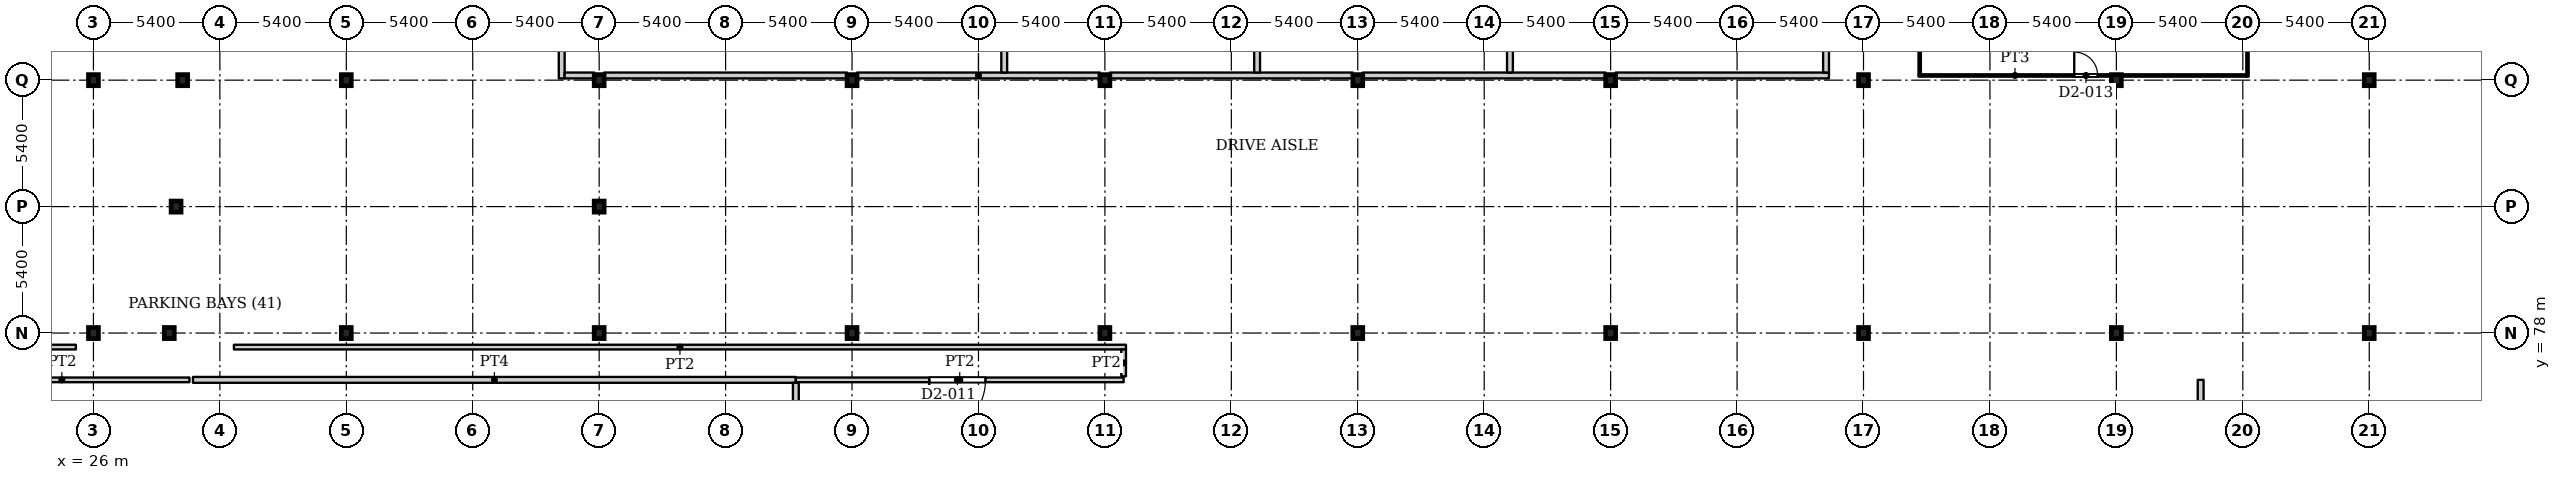
"""IFC4 building model, lengths in metres.
Left out: names, types, materials, properties, quantities, classifications, styles, units other than length and angle.
Written with IfcOpenShell. Run it as: python <this file> out.ifc"""

import sys

from ifc_helpers import new_model, si_unit, direction, frame, frame_2d, origin, origin_2d, place, context, subcontext, project, spatial, rectangle, i_section, extrude, source, transform, mapped, element, fill, save


model = new_model("IFC4")
c1 = context("Model", 3, precision=1e-05, world=origin(), true_north=direction((0.0, 1.0)))
c2 = subcontext(c1, "Body", "Model", "MODEL_VIEW")
j1 = project(units=[si_unit("LENGTHUNIT", "METRE"), si_unit("PLANEANGLEUNIT", "RADIAN")], contexts=[c1])
p1 = place(None, origin())
s1 = spatial("IfcSite", under=j1, at=p1, CompositionType="ELEMENT")
p2 = place(p1, origin())
s2 = spatial("IfcBuilding", under=s1, at=p2, CompositionType="ELEMENT")
p3 = place(p2, frame((0.0, 0.0, -10.0)))
s3 = spatial("IfcBuildingStorey", under=s2, at=p3, CompositionType="ELEMENT", Elevation=-10.0)
for number, where, z_axis, x_axis in (
    (1, (26.0, 78.0, 0.0), (0.0, 0.0, 1.0), (1.0, 0.0, 0.0)),
    (2, (36.8, 78.0, 0.0), (0.0, 0.0, 1.0), (1.0, 0.0, 0.0)),
    (3, (47.6, 78.0, 0.0), (0.0, 0.0, 1.0), (1.0, 0.0, 0.0)),
    (4, (58.4, 78.0, 0.0), (0.0, 0.0, 1.0), (1.0, 0.0, 0.0)),
    (5, (69.2, 78.0, 0.0), (0.0, 0.0, 1.0), (1.0, 0.0, 0.0)),
    (6, (80.0, 78.0, 0.0), (0.0, 0.0, 1.0), (1.0, 0.0, 0.0)),
    (7, (90.8, 78.0, 0.0), (0.0, 0.0, 1.0), (1.0, 0.0, 0.0)),
    (8, (101.6, 78.0, 0.0), (0.0, 0.0, 1.0), (1.0, 0.0, 0.0)),
    (9, (112.4, 78.0, 0.0), (0.0, 0.0, 1.0), (1.0, 0.0, 0.0)),
    (10, (123.2, 78.0, 0.0), (0.0, 0.0, 1.0), (1.0, 0.0, 0.0)),
    (11, (26.0, 88.8, 0.0), (0.0, 0.0, 1.0), (1.0, 0.0, 0.0)),
    (12, (36.8, 88.8, 0.0), (0.0, 0.0, 1.0), (1.0, 0.0, 0.0)),
    (13, (47.6, 88.8, 0.0), (0.0, 0.0, 1.0), (1.0, 0.0, 0.0)),
    (14, (58.4, 88.8, 0.0), (0.0, 0.0, 1.0), (1.0, 0.0, 0.0)),
    (15, (69.2, 88.8, 0.0), (0.0, 0.0, 1.0), (1.0, 0.0, 0.0)),
    (16, (80.0, 88.8, 0.0), (0.0, 0.0, 1.0), (1.0, 0.0, 0.0)),
    (17, (90.8, 88.8, 0.0), (0.0, 0.0, 1.0), (1.0, 0.0, 0.0)),
    (18, (101.6, 88.8, 0.0), (0.0, 0.0, 1.0), (1.0, 0.0, 0.0)),
    (19, (112.4, 88.8, 0.0), (0.0, 0.0, 1.0), (1.0, 0.0, 0.0)),
    (20, (123.2, 88.8, 0.0), (0.0, 0.0, 1.0), (1.0, 0.0, 0.0)),
    (21, (29.24, 78.0, 0.0), (0.0, 0.0, 1.0), (1.0, 0.0, 0.0)),
    (22, (29.53, 83.4, 0.0), (0.0, 0.0, 1.0), (1.0, 0.0, 0.0)),
    (23, (47.6, 83.4, 0.0), (0.0, 0.0, 1.0), (1.0, 0.0, 0.0)),
    (24, (29.81, 88.8, 0.0), (0.0, 0.0, 1.0), (1.0, 0.0, 0.0)),
):
    element("IfcColumn", number, at=place(p3, frame(where, z_axis=z_axis, x_axis=x_axis)), inside=s3, PredefinedType="COLUMN", context=c2, shape_type="SweptSolid", body=[
        extrude(i_section(OverallWidth=0.424, OverallDepth=0.474, WebThickness=0.048, FlangeThickness=0.077, FilletRadius=0.014, at=origin_2d()), origin(), (0.0, 0.0, 1.0), 5.0),
    ])
p4 = place(p3, frame((16.7, 77.4, 0.0), z_axis=(0.0, 0.0, 1.0), x_axis=(1.0, 0.0, 0.0)))
e25 = element("IfcWall", 25, at=p4, inside=s3, PredefinedType="PARTITIONING", context=c2, shape_type="SweptSolid", body=[
    extrude(rectangle(XDim=8.55, YDim=0.2, at=frame_2d((4.275, 0.0))), origin(), (0.0, 0.0, 1.0), 4.58),
])
p5 = place(p3, frame((19.2, 76.0, 0.0), z_axis=(0.0, 0.0, 1.0), x_axis=(1.0, 0.0, 0.0)))
e26 = element("IfcWall", 26, at=p5, inside=s3, PredefinedType="PARTITIONING", context=c2, shape_type="SweptSolid", body=[
    extrude(rectangle(XDim=10.9, YDim=0.2, at=frame_2d((5.45, 0.0))), origin(), (0.0, 0.0, 1.0), 4.58),
])
p6 = place(p3, frame((30.25, 76.0, 0.0), z_axis=(0.0, 0.0, 1.0), x_axis=(1.0, 0.0, 0.0)))
e27 = element("IfcWall", 27, at=p6, inside=s3, PredefinedType="PARTITIONING", context=c2, shape_type="SweptSolid", body=[
    extrude(rectangle(XDim=25.75, YDim=0.25, at=frame_2d((12.875, 0.0))), origin(), (0.0, 0.0, 1.0), 4.58),
])
p7 = place(p3, frame((32.0, 77.4, 0.0), z_axis=(0.0, 0.0, 1.0), x_axis=(1.0, 0.0, 0.0)))
e28 = element("IfcWall", 28, at=p7, inside=s3, PredefinedType="PARTITIONING", context=c2, shape_type="SweptSolid", body=[
    extrude(rectangle(XDim=38.1, YDim=0.2, at=frame_2d((19.05, 0.0))), origin(), (0.0, 0.0, 1.0), 4.58),
])
p8 = place(p3, frame((46.0, 88.875, 0.0), z_axis=(0.0, 0.0, 1.0), x_axis=(0.0, 1.0, 0.0)))
e29 = element("IfcWall", 29, at=p8, inside=s3, PredefinedType="PARTITIONING", context=c2, shape_type="SweptSolid", body=[
    extrude(rectangle(XDim=7.8, YDim=0.25, at=frame_2d((3.9, 0.0))), origin(), (0.0, 0.0, 1.0), 4.58),
])
p9 = place(p3, frame((46.125, 89.0, 0.0), z_axis=(0.0, 0.0, 1.0), x_axis=(1.0, 0.0, 0.0)))
e30 = element("IfcWall", 30, at=p9, inside=s3, PredefinedType="PARTITIONING", context=c2, shape_type="SweptSolid", body=[
    extrude(rectangle(XDim=1.264, YDim=0.25, at=frame_2d((0.632, 0.0))), origin(), (0.0, 0.0, 1.0), 4.58),
])
p10 = place(p3, frame((47.811, 89.0, 0.0), z_axis=(0.0, 0.0, 1.0), x_axis=(1.0, 0.0, 0.0)))
e31 = element("IfcWall", 31, at=p10, inside=s3, PredefinedType="PARTITIONING", context=c2, shape_type="SweptSolid", body=[
    extrude(rectangle(XDim=10.378, YDim=0.25, at=frame_2d((5.189, 0.0))), origin(), (0.0, 0.0, 1.0), 4.58),
])
p11 = place(p3, frame((56.0, 69.4, 0.0), z_axis=(0.0, 0.0, 1.0), x_axis=(0.0, 1.0, 0.0)))
e32 = element("IfcWall", 32, at=p11, inside=s3, PredefinedType="PARTITIONING", context=c2, shape_type="SweptSolid", body=[
    extrude(rectangle(XDim=6.475, YDim=0.25, at=frame_2d((3.238, 0.0))), origin(), (0.0, 0.0, 1.0), 4.58),
])
p12 = place(p11, frame((2.75, 0.0, 0.0)))
e33 = element("IfcOpeningElement", 33, at=p12, cuts=e32, PredefinedType="OPENING", context=c2, shape_type="SweptSolid", body=[
    extrude(rectangle(XDim=1.2, YDim=2.1, at=frame_2d((0.6, 1.05))), frame((0.0, 0.135, 0.0), z_axis=(0.0, -1.0, 0.0), x_axis=(1.0, 0.0, 0.0)), (0.0, 0.0, 1.0), 0.27),
])
p13 = place(p3, frame((56.0, 76.0, 0.0), z_axis=(0.0, 0.0, 1.0), x_axis=(1.0, 0.0, 0.0)))
e34 = element("IfcWall", 34, at=p13, inside=s3, PredefinedType="PARTITIONING", context=c2, shape_type="SweptSolid", body=[
    extrude(rectangle(XDim=14.0, YDim=0.2, at=frame_2d((7.0, 0.0))), origin(), (0.0, 0.0, 1.0), 4.58),
])
p14 = place(p13, frame((5.7, 0.0, 0.0)))
e35 = element("IfcOpeningElement", 35, at=p14, cuts=e34, PredefinedType="OPENING", context=c2, shape_type="SweptSolid", body=[
    extrude(rectangle(XDim=2.4, YDim=2.1, at=frame_2d((1.2, 1.05))), frame((0.0, 0.11, 0.0), z_axis=(0.0, -1.0, 0.0), x_axis=(1.0, 0.0, 0.0)), (0.0, 0.0, 1.0), 0.22),
])
p15 = place(p3, frame((58.611, 89.0, 0.0), z_axis=(0.0, 0.0, 1.0), x_axis=(1.0, 0.0, 0.0)))
e36 = element("IfcWall", 36, at=p15, inside=s3, PredefinedType="PARTITIONING", context=c2, shape_type="SweptSolid", body=[
    extrude(rectangle(XDim=10.378, YDim=0.25, at=frame_2d((5.189, 0.0))), origin(), (0.0, 0.0, 1.0), 4.58),
])
p16 = place(p3, frame((64.9, 89.125, 0.0), z_axis=(0.0, 0.0, 1.0), x_axis=(0.0, 1.0, 0.0)))
e37 = element("IfcWall", 37, at=p16, inside=s3, PredefinedType="PARTITIONING", context=c2, shape_type="SweptSolid", body=[
    extrude(rectangle(XDim=7.55, YDim=0.25, at=frame_2d((3.775, 0.0))), origin(), (0.0, 0.0, 1.0), 4.58),
])
p17 = place(p3, frame((69.411, 89.0, 0.0), z_axis=(0.0, 0.0, 1.0), x_axis=(1.0, 0.0, 0.0)))
e38 = element("IfcWall", 38, at=p17, inside=s3, PredefinedType="PARTITIONING", context=c2, shape_type="SweptSolid", body=[
    extrude(rectangle(XDim=10.378, YDim=0.25, at=frame_2d((5.189, 0.0))), origin(), (0.0, 0.0, 1.0), 4.58),
])
p18 = place(p3, frame((70.0, 76.15, 0.0), z_axis=(0.0, 0.0, 1.0), x_axis=(0.0, 1.0, 0.0)))
e39 = element("IfcWall", 39, at=p18, inside=s3, PredefinedType="PARTITIONING", context=c2, shape_type="SweptSolid", body=[
    extrude(rectangle(XDim=1.15, YDim=0.2, at=frame_2d((0.575, 0.0))), origin(), (0.0, 0.0, 1.0), 4.58),
])
p19 = place(p3, frame((75.7, 89.125, 0.0), z_axis=(0.0, 0.0, 1.0), x_axis=(0.0, 1.0, 0.0)))
e40 = element("IfcWall", 40, at=p19, inside=s3, PredefinedType="PARTITIONING", context=c2, shape_type="SweptSolid", body=[
    extrude(rectangle(XDim=7.55, YDim=0.25, at=frame_2d((3.775, 0.0))), origin(), (0.0, 0.0, 1.0), 4.58),
])
p20 = place(p3, frame((80.211, 89.0, 0.0), z_axis=(0.0, 0.0, 1.0), x_axis=(1.0, 0.0, 0.0)))
e41 = element("IfcWall", 41, at=p20, inside=s3, PredefinedType="PARTITIONING", context=c2, shape_type="SweptSolid", body=[
    extrude(rectangle(XDim=10.378, YDim=0.25, at=frame_2d((5.189, 0.0))), origin(), (0.0, 0.0, 1.0), 4.58),
])
p21 = place(p3, frame((86.5, 89.125, 0.0), z_axis=(0.0, 0.0, 1.0), x_axis=(0.0, 1.0, 0.0)))
e42 = element("IfcWall", 42, at=p21, inside=s3, PredefinedType="PARTITIONING", context=c2, shape_type="SweptSolid", body=[
    extrude(rectangle(XDim=7.55, YDim=0.25, at=frame_2d((3.775, 0.0))), origin(), (0.0, 0.0, 1.0), 4.58),
])
p22 = place(p3, frame((91.011, 89.0, 0.0), z_axis=(0.0, 0.0, 1.0), x_axis=(1.0, 0.0, 0.0)))
e43 = element("IfcWall", 43, at=p22, inside=s3, PredefinedType="PARTITIONING", context=c2, shape_type="SweptSolid", body=[
    extrude(rectangle(XDim=9.114, YDim=0.25, at=frame_2d((4.557, 0.0))), origin(), (0.0, 0.0, 1.0), 4.58),
])
p23 = place(p3, frame((100.0, 89.125, 0.0), z_axis=(0.0, 0.0, 1.0), x_axis=(0.0, 1.0, 0.0)))
e44 = element("IfcWall", 44, at=p23, inside=s3, PredefinedType="PARTITIONING", context=c2, shape_type="SweptSolid", body=[
    extrude(rectangle(XDim=7.675, YDim=0.25, at=frame_2d((3.837, 0.0))), origin(), (0.0, 0.0, 1.0), 4.58),
])
p24 = place(p3, frame((103.95, 89.0, 0.0), z_axis=(0.0, 0.0, 1.0), x_axis=(1.0, 0.0, 0.0)))
e45 = element("IfcWall", 45, at=p24, inside=s3, PredefinedType="PARTITIONING", context=c2, shape_type="SweptSolid", body=[
    extrude(rectangle(XDim=8.239, YDim=0.1, at=frame_2d((4.12, 0.0))), origin(), (0.0, 0.0, 1.0), 4.58),
])
p25 = place(p24, frame((6.65, 0.0, 0.0)))
e46 = element("IfcOpeningElement", 46, at=p25, cuts=e45, PredefinedType="OPENING", context=c2, shape_type="SweptSolid", body=[
    extrude(rectangle(XDim=1.0, YDim=2.1, at=frame_2d((0.5, 1.05))), frame((0.0, 0.06, 0.0), z_axis=(0.0, -1.0, 0.0), x_axis=(1.0, 0.0, 0.0)), (0.0, 0.0, 1.0), 0.12),
])
p26 = place(p3, frame((104.0, 89.05, 0.0), z_axis=(0.0, 0.0, 1.0), x_axis=(0.0, 1.0, 0.0)))
e47 = element("IfcWall", 47, at=p26, inside=s3, PredefinedType="PARTITIONING", context=c2, shape_type="SweptSolid", body=[
    extrude(rectangle(XDim=6.9, YDim=0.1, at=frame_2d((3.45, 0.0))), origin(), (0.0, 0.0, 1.0), 4.58),
])
p27 = place(p3, frame((112.611, 89.0, 0.0), z_axis=(0.0, 0.0, 1.0), x_axis=(1.0, 0.0, 0.0)))
e48 = element("IfcWall", 48, at=p27, inside=s3, PredefinedType="PARTITIONING", context=c2, shape_type="SweptSolid", body=[
    extrude(rectangle(XDim=5.339, YDim=0.1, at=frame_2d((2.669, 0.0))), origin(), (0.0, 0.0, 1.0), 4.58),
])
p28 = place(p3, frame((116.0, 42.0, 0.0), z_axis=(0.0, 0.0, 1.0), x_axis=(0.0, 1.0, 0.0)))
e49 = element("IfcWall", 49, at=p28, inside=s3, PredefinedType="PARTITIONING", context=c2, shape_type="SweptSolid", body=[
    extrude(rectangle(XDim=34.0, YDim=0.25, at=frame_2d((17.0, 0.0))), origin(), (0.0, 0.0, 1.0), 4.58),
])
p29 = place(p28, frame((9.4, 0.0, 0.0)))
e50 = element("IfcOpeningElement", 50, at=p29, cuts=e49, PredefinedType="OPENING", context=c2, shape_type="SweptSolid", body=[
    extrude(rectangle(XDim=1.2, YDim=2.1, at=frame_2d((0.6, 1.05))), frame((0.0, 0.135, 0.0), z_axis=(0.0, -1.0, 0.0), x_axis=(1.0, 0.0, 0.0)), (0.0, 0.0, 1.0), 0.27),
])
p30 = place(p28, frame((25.4, 0.0, 0.0)))
e51 = element("IfcOpeningElement", 51, at=p30, cuts=e49, PredefinedType="OPENING", context=c2, shape_type="SweptSolid", body=[
    extrude(rectangle(XDim=1.2, YDim=2.1, at=frame_2d((0.6, 1.05))), frame((0.0, 0.135, 0.0), z_axis=(0.0, -1.0, 0.0), x_axis=(1.0, 0.0, 0.0)), (0.0, 0.0, 1.0), 0.27),
])
p31 = place(p3, frame((118.0, 88.95, 0.0), z_axis=(0.0, 0.0, 1.0), x_axis=(0.0, 1.0, 0.0)))
e52 = element("IfcWall", 52, at=p31, inside=s3, PredefinedType="PARTITIONING", context=c2, shape_type="SweptSolid", body=[
    extrude(rectangle(XDim=7.0, YDim=0.1, at=frame_2d((3.5, 0.0))), origin(), (0.0, 0.0, 1.0), 4.58),
])
m1 = source(origin(), c2, "Body", "SweptSolid", [
    extrude(rectangle(XDim=2.4, YDim=2.1, at=frame_2d((1.2, 1.05))), frame((0.0, 0.025, 0.0), z_axis=(0.0, -1.0, 0.0), x_axis=(1.0, 0.0, 0.0)), (0.0, 0.0, 1.0), 0.05),
])
p32 = place(p14, origin())
e53 = element("IfcDoor", 53, at=p32, inside=s3, OperationType="DOUBLE_DOOR_SINGLE_SWING", PredefinedType="DOOR", context=c2, shape_type="MappedRepresentation", body=[
    mapped(m1, transform((0.0, 0.0, 0.0), x_axis=(1.0, 0.0, 0.0), y_axis=(0.0, 1.0, 0.0), z_axis=(0.0, 0.0, 1.0), scale=1.0)),
])
fill(e35, e53)
m2 = source(origin(), c2, "Body", "SweptSolid", [
    extrude(rectangle(XDim=1.0, YDim=2.1, at=frame_2d((0.5, 1.05))), frame((0.0, 0.025, 0.0), z_axis=(0.0, -1.0, 0.0), x_axis=(1.0, 0.0, 0.0)), (0.0, 0.0, 1.0), 0.05),
])
p33 = place(p25, origin())
e54 = element("IfcDoor", 54, at=p33, inside=s3, OperationType="SINGLE_SWING_LEFT", PredefinedType="DOOR", context=c2, shape_type="MappedRepresentation", body=[
    mapped(m2, transform((0.0, 0.0, 0.0), x_axis=(1.0, 0.0, 0.0), y_axis=(0.0, 1.0, 0.0), z_axis=(0.0, 0.0, 1.0), scale=1.0)),
])
fill(e46, e54)
save(model, sys.argv[1])
